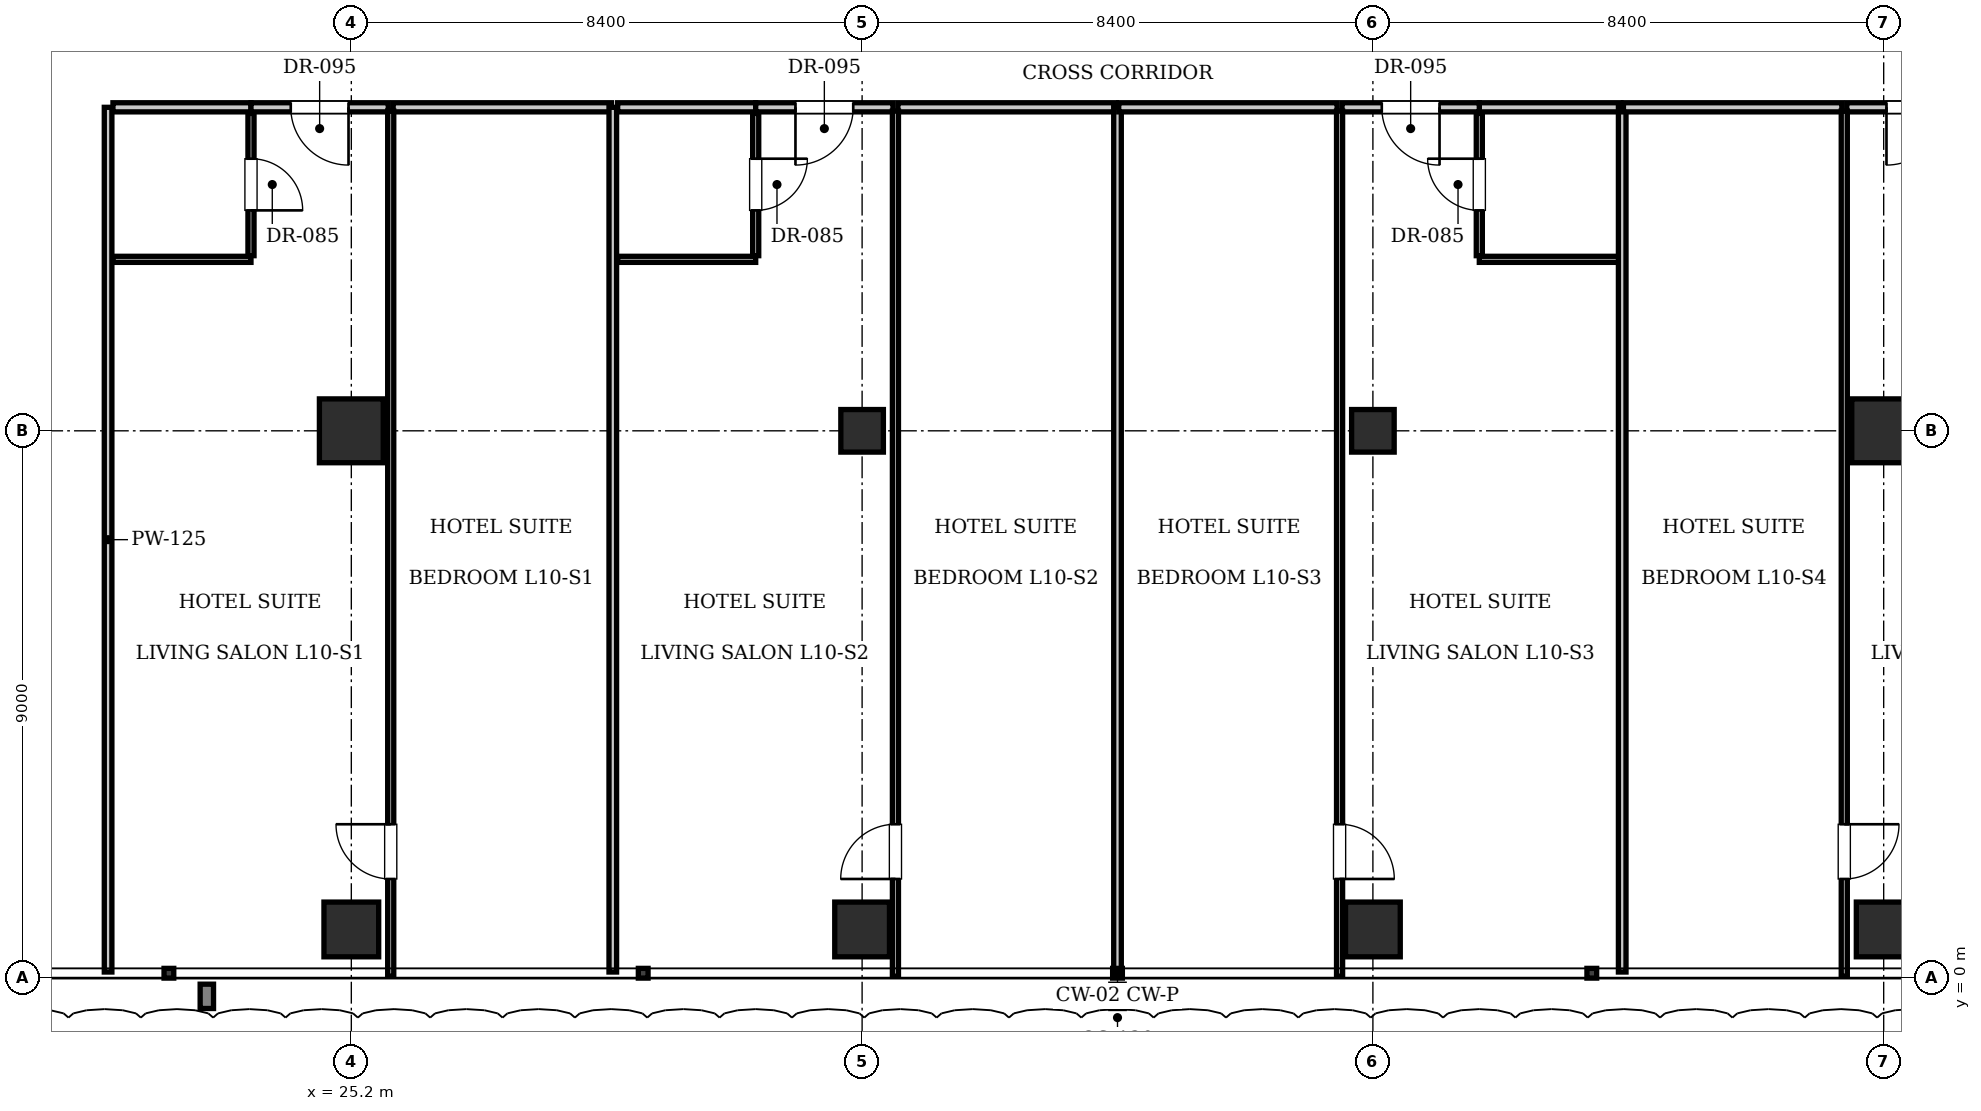
"""IFC4 building model, lengths in metres.
Left out: names, types, materials, properties, quantities, classifications, styles, units other than length and angle.
Written with IfcOpenShell. Run it as: python <this file> out.ifc"""

import sys

from ifc_helpers import new_model, si_unit, direction, frame, frame_2d, origin, origin_2d, place, context, subcontext, project, spatial, rectangle, i_section, extrude, element, fill, save


model = new_model("IFC4")
c1 = context("Model", 3, precision=1e-05, world=origin(), true_north=direction((0.0, 1.0)))
c2 = subcontext(c1, "Body", "Model", "MODEL_VIEW")
j1 = project(units=[si_unit("LENGTHUNIT", "METRE"), si_unit("PLANEANGLEUNIT", "RADIAN")], contexts=[c1])
p1 = place(None, origin())
s1 = spatial("IfcSite", under=j1, at=p1, CompositionType="ELEMENT")
p2 = place(p1, origin())
s2 = spatial("IfcBuilding", under=s1, at=p2, CompositionType="ELEMENT")
p3 = place(p2, frame((0.0, 0.0, 46.2)))
s3 = spatial("IfcBuildingStorey", under=s2, at=p3, CompositionType="ELEMENT", Elevation=46.2)
for number, where, z_axis, x_axis in (
    (1, (25.2, 9.0, 0.0), (0.0, 0.0, 1.0), (1.0, 0.0, 0.0)),
    (2, (50.4, 9.0, 0.0), (0.0, 0.0, 1.0), (1.0, 0.0, 0.0)),
):
    element("IfcColumn", number, at=place(p3, frame(where, z_axis=z_axis, x_axis=x_axis)), inside=s3, PredefinedType="COLUMN", context=c2, shape_type="SweptSolid", body=[
        extrude(rectangle(XDim=1.05, YDim=1.05, at=origin_2d()), origin(), (0.0, 0.0, 1.0), 3.85),
    ])
for number, where, z_axis, x_axis in (
    (3, (33.6, 9.0, 0.0), (0.0, 0.0, 1.0), (1.0, 0.0, 0.0)),
    (4, (42.0, 9.0, 0.0), (0.0, 0.0, 1.0), (1.0, 0.0, 0.0)),
):
    element("IfcColumn", number, at=place(p3, frame(where, z_axis=z_axis, x_axis=x_axis)), inside=s3, PredefinedType="COLUMN", context=c2, shape_type="SweptSolid", body=[
        extrude(i_section(OverallWidth=0.7, OverallDepth=0.7, WebThickness=0.028, FlangeThickness=0.044, at=origin_2d()), origin(), (0.0, 0.0, 1.0), 3.85),
    ])
for number, where, z_axis, x_axis in (
    (5, (25.2, 0.8, 0.0), (0.0, 0.0, 1.0), (1.0, 0.0, 0.0)),
    (6, (33.6, 0.8, 0.0), (0.0, 0.0, 1.0), (1.0, 0.0, 0.0)),
    (7, (42.0, 0.8, 0.0), (0.0, 0.0, 1.0), (1.0, 0.0, 0.0)),
    (8, (50.4, 0.8, 0.0), (0.0, 0.0, 1.0), (1.0, 0.0, 0.0)),
):
    element("IfcColumn", number, at=place(p3, frame(where, z_axis=z_axis, x_axis=x_axis)), inside=s3, PredefinedType="COLUMN", context=c2, shape_type="SweptSolid", body=[
        extrude(rectangle(XDim=0.9, YDim=0.9, at=origin_2d()), origin(), (0.0, 0.0, 1.0), 3.85),
    ])
p4 = place(p3, frame((21.2, 0.1, 0.0), z_axis=(0.0, 0.0, 1.0), x_axis=(0.0, 1.0, 0.0)))
e9 = element("IfcWall", 9, at=p4, inside=s3, PredefinedType="PARTITIONING", context=c2, shape_type="SweptSolid", body=[
    extrude(rectangle(XDim=14.22, YDim=0.125, at=frame_2d((7.11, 0.0))), origin(), (0.0, 0.0, 1.0), 3.61),
])
p5 = place(p3, frame((21.28, 14.32, 0.0), z_axis=(0.0, 0.0, 1.0), x_axis=(1.0, 0.0, 0.0)))
e10 = element("IfcWall", 10, at=p5, inside=s3, PredefinedType="PARTITIONING", context=c2, shape_type="SweptSolid", body=[
    extrude(rectangle(XDim=2.27, YDim=0.15, at=frame_2d((1.135, 0.0))), origin(), (0.0, 0.0, 1.0), 3.61),
])
p6 = place(p3, frame((21.28, 11.82, 0.0), z_axis=(0.0, 0.0, 1.0), x_axis=(1.0, 0.0, 0.0)))
e11 = element("IfcWall", 11, at=p6, inside=s3, PredefinedType="PARTITIONING", context=c2, shape_type="SweptSolid", body=[
    extrude(rectangle(XDim=2.27, YDim=0.1, at=frame_2d((1.135, 0.0))), origin(), (0.0, 0.0, 1.0), 3.61),
])
p7 = place(p3, frame((23.55, 11.88, 0.0), z_axis=(0.0, 0.0, 1.0), x_axis=(0.0, 1.0, 0.0)))
e12 = element("IfcWall", 12, at=p7, inside=s3, PredefinedType="PARTITIONING", context=c2, shape_type="SweptSolid", body=[
    extrude(rectangle(XDim=2.34, YDim=0.1, at=frame_2d((1.17, 0.0))), origin(), (0.0, 0.0, 1.0), 3.61),
])
p8 = place(p7, frame((0.745, 0.0, 0.0)))
e13 = element("IfcOpeningElement", 13, at=p8, cuts=e12, PredefinedType="OPENING", context=c2, shape_type="SweptSolid", body=[
    extrude(rectangle(XDim=0.85, YDim=2.1, at=frame_2d((0.425, 1.05))), frame((0.0, 0.06, 0.0), z_axis=(0.0, -1.0, 0.0), x_axis=(1.0, 0.0, 0.0)), (0.0, 0.0, 1.0), 0.12),
])
p9 = place(p3, frame((23.55, 14.32, 0.0), z_axis=(0.0, 0.0, 1.0), x_axis=(1.0, 0.0, 0.0)))
e14 = element("IfcWall", 14, at=p9, inside=s3, PredefinedType="PARTITIONING", context=c2, shape_type="SweptSolid", body=[
    extrude(rectangle(XDim=2.258, YDim=0.15, at=frame_2d((1.129, 0.0))), origin(), (0.0, 0.0, 1.0), 3.61),
])
p10 = place(p9, frame((0.654, 0.0, 0.0)))
e15 = element("IfcOpeningElement", 15, at=p10, cuts=e14, PredefinedType="OPENING", context=c2, shape_type="SweptSolid", body=[
    extrude(rectangle(XDim=0.95, YDim=2.15, at=frame_2d((0.475, 1.075))), frame((0.0, 0.085, 0.0), z_axis=(0.0, -1.0, 0.0), x_axis=(1.0, 0.0, 0.0)), (0.0, 0.0, 1.0), 0.17),
])
p11 = place(p3, frame((25.888, 14.32, 0.0), z_axis=(0.0, 0.0, 1.0), x_axis=(1.0, 0.0, 0.0)))
e16 = element("IfcWall", 16, at=p11, inside=s3, PredefinedType="PARTITIONING", context=c2, shape_type="SweptSolid", body=[
    extrude(rectangle(XDim=3.592, YDim=0.15, at=frame_2d((1.796, 0.0))), origin(), (0.0, 0.0, 1.0), 3.61),
])
p12 = place(p3, frame((25.848, 0.03, 0.0), z_axis=(0.0, 0.0, 1.0), x_axis=(0.0, 1.0, 0.0)))
e17 = element("IfcWall", 17, at=p12, inside=s3, PredefinedType="PARTITIONING", context=c2, shape_type="SweptSolid", body=[
    extrude(rectangle(XDim=14.23, YDim=0.1, at=frame_2d((7.115, 0.0))), origin(), (0.0, 0.0, 1.0), 3.61),
])
p13 = place(p12, frame((1.6, 0.0, 0.0)))
e18 = element("IfcOpeningElement", 18, at=p13, cuts=e17, PredefinedType="OPENING", context=c2, shape_type="SweptSolid", body=[
    extrude(rectangle(XDim=0.9, YDim=2.1, at=frame_2d((0.45, 1.05))), frame((0.0, 0.06, 0.0), z_axis=(0.0, -1.0, 0.0), x_axis=(1.0, 0.0, 0.0)), (0.0, 0.0, 1.0), 0.12),
])
p14 = place(p3, frame((29.5, 0.1, 0.0), z_axis=(0.0, 0.0, 1.0), x_axis=(0.0, 1.0, 0.0)))
e19 = element("IfcWall", 19, at=p14, inside=s3, PredefinedType="PARTITIONING", context=c2, shape_type="SweptSolid", body=[
    extrude(rectangle(XDim=14.22, YDim=0.125, at=frame_2d((7.11, 0.0))), origin(), (0.0, 0.0, 1.0), 3.255),
])
p15 = place(p3, frame((29.58, 14.32, 0.0), z_axis=(0.0, 0.0, 1.0), x_axis=(1.0, 0.0, 0.0)))
e20 = element("IfcWall", 20, at=p15, inside=s3, PredefinedType="PARTITIONING", context=c2, shape_type="SweptSolid", body=[
    extrude(rectangle(XDim=2.27, YDim=0.15, at=frame_2d((1.135, 0.0))), origin(), (0.0, 0.0, 1.0), 3.61),
])
p16 = place(p3, frame((29.58, 11.82, 0.0), z_axis=(0.0, 0.0, 1.0), x_axis=(1.0, 0.0, 0.0)))
e21 = element("IfcWall", 21, at=p16, inside=s3, PredefinedType="PARTITIONING", context=c2, shape_type="SweptSolid", body=[
    extrude(rectangle(XDim=2.27, YDim=0.1, at=frame_2d((1.135, 0.0))), origin(), (0.0, 0.0, 1.0), 3.61),
])
p17 = place(p3, frame((31.85, 11.88, 0.0), z_axis=(0.0, 0.0, 1.0), x_axis=(0.0, 1.0, 0.0)))
e22 = element("IfcWall", 22, at=p17, inside=s3, PredefinedType="PARTITIONING", context=c2, shape_type="SweptSolid", body=[
    extrude(rectangle(XDim=2.34, YDim=0.1, at=frame_2d((1.17, 0.0))), origin(), (0.0, 0.0, 1.0), 3.61),
])
p18 = place(p17, frame((0.745, 0.0, 0.0)))
e23 = element("IfcOpeningElement", 23, at=p18, cuts=e22, PredefinedType="OPENING", context=c2, shape_type="SweptSolid", body=[
    extrude(rectangle(XDim=0.85, YDim=2.1, at=frame_2d((0.425, 1.05))), frame((0.0, 0.06, 0.0), z_axis=(0.0, -1.0, 0.0), x_axis=(1.0, 0.0, 0.0)), (0.0, 0.0, 1.0), 0.12),
])
p19 = place(p3, frame((31.85, 14.32, 0.0), z_axis=(0.0, 0.0, 1.0), x_axis=(1.0, 0.0, 0.0)))
e24 = element("IfcWall", 24, at=p19, inside=s3, PredefinedType="PARTITIONING", context=c2, shape_type="SweptSolid", body=[
    extrude(rectangle(XDim=2.258, YDim=0.15, at=frame_2d((1.129, 0.0))), origin(), (0.0, 0.0, 1.0), 3.61),
])
p20 = place(p19, frame((0.654, 0.0, 0.0)))
e25 = element("IfcOpeningElement", 25, at=p20, cuts=e24, PredefinedType="OPENING", context=c2, shape_type="SweptSolid", body=[
    extrude(rectangle(XDim=0.95, YDim=2.15, at=frame_2d((0.475, 1.075))), frame((0.0, 0.085, 0.0), z_axis=(0.0, -1.0, 0.0), x_axis=(1.0, 0.0, 0.0)), (0.0, 0.0, 1.0), 0.17),
])
p21 = place(p3, frame((34.188, 14.32, 0.0), z_axis=(0.0, 0.0, 1.0), x_axis=(1.0, 0.0, 0.0)))
e26 = element("IfcWall", 26, at=p21, inside=s3, PredefinedType="PARTITIONING", context=c2, shape_type="SweptSolid", body=[
    extrude(rectangle(XDim=3.592, YDim=0.15, at=frame_2d((1.796, 0.0))), origin(), (0.0, 0.0, 1.0), 3.61),
])
p22 = place(p3, frame((34.148, 0.03, 0.0), z_axis=(0.0, 0.0, 1.0), x_axis=(0.0, 1.0, 0.0)))
e27 = element("IfcWall", 27, at=p22, inside=s3, PredefinedType="PARTITIONING", context=c2, shape_type="SweptSolid", body=[
    extrude(rectangle(XDim=14.23, YDim=0.1, at=frame_2d((7.115, 0.0))), origin(), (0.0, 0.0, 1.0), 3.61),
])
p23 = place(p22, frame((1.6, 0.0, 0.0)))
e28 = element("IfcOpeningElement", 28, at=p23, cuts=e27, PredefinedType="OPENING", context=c2, shape_type="SweptSolid", body=[
    extrude(rectangle(XDim=0.9, YDim=2.1, at=frame_2d((0.45, 1.05))), frame((0.0, 0.06, 0.0), z_axis=(0.0, -1.0, 0.0), x_axis=(1.0, 0.0, 0.0)), (0.0, 0.0, 1.0), 0.12),
])
p24 = place(p3, frame((37.8, 0.1, 0.0), z_axis=(0.0, 0.0, 1.0), x_axis=(0.0, 1.0, 0.0)))
e29 = element("IfcWall", 29, at=p24, inside=s3, PredefinedType="PARTITIONING", context=c2, shape_type="SweptSolid", body=[
    extrude(rectangle(XDim=14.22, YDim=0.125, at=frame_2d((7.11, 0.0))), origin(), (0.0, 0.0, 1.0), 3.293),
])
p25 = place(p3, frame((43.75, 14.32, 0.0), z_axis=(0.0, 0.0, 1.0), x_axis=(1.0, 0.0, 0.0)))
e30 = element("IfcWall", 30, at=p25, inside=s3, PredefinedType="PARTITIONING", context=c2, shape_type="SweptSolid", body=[
    extrude(rectangle(XDim=2.33, YDim=0.15, at=frame_2d((1.165, 0.0))), origin(), (0.0, 0.0, 1.0), 3.61),
])
p26 = place(p3, frame((43.75, 11.82, 0.0), z_axis=(0.0, 0.0, 1.0), x_axis=(1.0, 0.0, 0.0)))
e31 = element("IfcWall", 31, at=p26, inside=s3, PredefinedType="PARTITIONING", context=c2, shape_type="SweptSolid", body=[
    extrude(rectangle(XDim=2.31, YDim=0.1, at=frame_2d((1.155, 0.0))), origin(), (0.0, 0.0, 1.0), 3.61),
])
p27 = place(p3, frame((43.75, 11.88, 0.0), z_axis=(0.0, 0.0, 1.0), x_axis=(0.0, 1.0, 0.0)))
e32 = element("IfcWall", 32, at=p27, inside=s3, PredefinedType="PARTITIONING", context=c2, shape_type="SweptSolid", body=[
    extrude(rectangle(XDim=2.34, YDim=0.1, at=frame_2d((1.17, 0.0))), origin(), (0.0, 0.0, 1.0), 3.61),
])
p28 = place(p27, frame((0.745, 0.0, 0.0)))
e33 = element("IfcOpeningElement", 33, at=p28, cuts=e32, PredefinedType="OPENING", context=c2, shape_type="SweptSolid", body=[
    extrude(rectangle(XDim=0.85, YDim=2.1, at=frame_2d((0.425, 1.05))), frame((0.0, 0.06, 0.0), z_axis=(0.0, -1.0, 0.0), x_axis=(1.0, 0.0, 0.0)), (0.0, 0.0, 1.0), 0.12),
])
p29 = place(p3, frame((37.82, 14.32, 0.0), z_axis=(0.0, 0.0, 1.0), x_axis=(1.0, 0.0, 0.0)))
e34 = element("IfcWall", 34, at=p29, inside=s3, PredefinedType="PARTITIONING", context=c2, shape_type="SweptSolid", body=[
    extrude(rectangle(XDim=3.592, YDim=0.15, at=frame_2d((1.796, 0.0))), origin(), (0.0, 0.0, 1.0), 3.61),
])
p30 = place(p3, frame((41.492, 14.32, 0.0), z_axis=(0.0, 0.0, 1.0), x_axis=(1.0, 0.0, 0.0)))
e35 = element("IfcWall", 35, at=p30, inside=s3, PredefinedType="PARTITIONING", context=c2, shape_type="SweptSolid", body=[
    extrude(rectangle(XDim=2.258, YDim=0.15, at=frame_2d((1.129, 0.0))), origin(), (0.0, 0.0, 1.0), 3.61),
])
p31 = place(p30, frame((0.654, 0.0, 0.0)))
e36 = element("IfcOpeningElement", 36, at=p31, cuts=e35, PredefinedType="OPENING", context=c2, shape_type="SweptSolid", body=[
    extrude(rectangle(XDim=0.95, YDim=2.15, at=frame_2d((0.475, 1.075))), frame((0.0, 0.085, 0.0), z_axis=(0.0, -1.0, 0.0), x_axis=(1.0, 0.0, 0.0)), (0.0, 0.0, 1.0), 0.17),
])
p32 = place(p3, frame((41.452, 0.03, 0.0), z_axis=(0.0, 0.0, 1.0), x_axis=(0.0, 1.0, 0.0)))
e37 = element("IfcWall", 37, at=p32, inside=s3, PredefinedType="PARTITIONING", context=c2, shape_type="SweptSolid", body=[
    extrude(rectangle(XDim=14.23, YDim=0.1, at=frame_2d((7.115, 0.0))), origin(), (0.0, 0.0, 1.0), 3.61),
])
p33 = place(p32, frame((1.6, 0.0, 0.0)))
e38 = element("IfcOpeningElement", 38, at=p33, cuts=e37, PredefinedType="OPENING", context=c2, shape_type="SweptSolid", body=[
    extrude(rectangle(XDim=0.9, YDim=2.1, at=frame_2d((0.45, 1.05))), frame((0.0, 0.06, 0.0), z_axis=(0.0, -1.0, 0.0), x_axis=(1.0, 0.0, 0.0)), (0.0, 0.0, 1.0), 0.12),
])
p34 = place(p3, frame((46.1, 0.1, 0.0), z_axis=(0.0, 0.0, 1.0), x_axis=(0.0, 1.0, 0.0)))
e39 = element("IfcWall", 39, at=p34, inside=s3, PredefinedType="PARTITIONING", context=c2, shape_type="SweptSolid", body=[
    extrude(rectangle(XDim=14.22, YDim=0.125, at=frame_2d((7.11, 0.0))), origin(), (0.0, 0.0, 1.0), 3.3),
])
p35 = place(p3, frame((46.12, 14.32, 0.0), z_axis=(0.0, 0.0, 1.0), x_axis=(1.0, 0.0, 0.0)))
e40 = element("IfcWall", 40, at=p35, inside=s3, PredefinedType="PARTITIONING", context=c2, shape_type="SweptSolid", body=[
    extrude(rectangle(XDim=3.592, YDim=0.15, at=frame_2d((1.796, 0.0))), origin(), (0.0, 0.0, 1.0), 3.61),
])
p36 = place(p3, frame((49.792, 14.32, 0.0), z_axis=(0.0, 0.0, 1.0), x_axis=(1.0, 0.0, 0.0)))
e41 = element("IfcWall", 41, at=p36, inside=s3, PredefinedType="PARTITIONING", context=c2, shape_type="SweptSolid", body=[
    extrude(rectangle(XDim=2.258, YDim=0.15, at=frame_2d((1.129, 0.0))), origin(), (0.0, 0.0, 1.0), 3.61),
])
p37 = place(p36, frame((0.654, 0.0, 0.0)))
e42 = element("IfcOpeningElement", 42, at=p37, cuts=e41, PredefinedType="OPENING", context=c2, shape_type="SweptSolid", body=[
    extrude(rectangle(XDim=0.95, YDim=2.15, at=frame_2d((0.475, 1.075))), frame((0.0, 0.085, 0.0), z_axis=(0.0, -1.0, 0.0), x_axis=(1.0, 0.0, 0.0)), (0.0, 0.0, 1.0), 0.17),
])
p38 = place(p3, frame((49.752, 0.03, 0.0), z_axis=(0.0, 0.0, 1.0), x_axis=(0.0, 1.0, 0.0)))
e43 = element("IfcWall", 43, at=p38, inside=s3, PredefinedType="PARTITIONING", context=c2, shape_type="SweptSolid", body=[
    extrude(rectangle(XDim=14.23, YDim=0.1, at=frame_2d((7.115, 0.0))), origin(), (0.0, 0.0, 1.0), 3.61),
])
p39 = place(p38, frame((1.6, 0.0, 0.0)))
e44 = element("IfcOpeningElement", 44, at=p39, cuts=e43, PredefinedType="OPENING", context=c2, shape_type="SweptSolid", body=[
    extrude(rectangle(XDim=0.9, YDim=2.1, at=frame_2d((0.45, 1.05))), frame((0.0, 0.06, 0.0), z_axis=(0.0, -1.0, 0.0), x_axis=(1.0, 0.0, 0.0)), (0.0, 0.0, 1.0), 0.12),
])
p40 = place(p8, frame((0.85, 0.0, 0.0), z_axis=(0.0, 0.0, 1.0), x_axis=(-1.0, 0.0, 0.0)))
e45 = element("IfcDoor", 45, at=p40, inside=s3, OperationType="SINGLE_SWING_RIGHT", PredefinedType="DOOR", context=c2, shape_type="SweptSolid", body=[
    extrude(rectangle(XDim=0.85, YDim=2.1, at=frame_2d((0.425, 1.05))), frame((0.0, 0.025, 0.0), z_axis=(0.0, -1.0, 0.0), x_axis=(1.0, 0.0, 0.0)), (0.0, 0.0, 1.0), 0.05),
])
fill(e13, e45)
p41 = place(p10, frame((0.95, 0.0, 0.0), z_axis=(0.0, 0.0, 1.0), x_axis=(-1.0, 0.0, 0.0)))
e46 = element("IfcDoor", 46, at=p41, inside=s3, OperationType="SINGLE_SWING_LEFT", PredefinedType="DOOR", context=c2, shape_type="SweptSolid", body=[
    extrude(rectangle(XDim=0.95, YDim=2.15, at=frame_2d((0.475, 1.075))), frame((0.0, 0.025, 0.0), z_axis=(0.0, -1.0, 0.0), x_axis=(1.0, 0.0, 0.0)), (0.0, 0.0, 1.0), 0.05),
])
fill(e15, e46)
p42 = place(p13, origin())
e47 = element("IfcDoor", 47, at=p42, inside=s3, OperationType="SINGLE_SWING_RIGHT", PredefinedType="DOOR", context=c2, shape_type="SweptSolid", body=[
    extrude(rectangle(XDim=0.9, YDim=2.1, at=frame_2d((0.45, 1.05))), frame((0.0, 0.025, 0.0), z_axis=(0.0, -1.0, 0.0), x_axis=(1.0, 0.0, 0.0)), (0.0, 0.0, 1.0), 0.05),
])
fill(e18, e47)
p43 = place(p18, frame((0.85, 0.0, 0.0), z_axis=(0.0, 0.0, 1.0), x_axis=(-1.0, 0.0, 0.0)))
e48 = element("IfcDoor", 48, at=p43, inside=s3, OperationType="SINGLE_SWING_LEFT", PredefinedType="DOOR", context=c2, shape_type="SweptSolid", body=[
    extrude(rectangle(XDim=0.85, YDim=2.1, at=frame_2d((0.425, 1.05))), frame((0.0, 0.025, 0.0), z_axis=(0.0, -1.0, 0.0), x_axis=(1.0, 0.0, 0.0)), (0.0, 0.0, 1.0), 0.05),
])
fill(e23, e48)
p44 = place(p20, frame((0.95, 0.0, 0.0), z_axis=(0.0, 0.0, 1.0), x_axis=(-1.0, 0.0, 0.0)))
e49 = element("IfcDoor", 49, at=p44, inside=s3, OperationType="SINGLE_SWING_RIGHT", PredefinedType="DOOR", context=c2, shape_type="SweptSolid", body=[
    extrude(rectangle(XDim=0.95, YDim=2.15, at=frame_2d((0.475, 1.075))), frame((0.0, 0.025, 0.0), z_axis=(0.0, -1.0, 0.0), x_axis=(1.0, 0.0, 0.0)), (0.0, 0.0, 1.0), 0.05),
])
fill(e25, e49)
p45 = place(p23, origin())
e50 = element("IfcDoor", 50, at=p45, inside=s3, OperationType="SINGLE_SWING_LEFT", PredefinedType="DOOR", context=c2, shape_type="SweptSolid", body=[
    extrude(rectangle(XDim=0.9, YDim=2.1, at=frame_2d((0.45, 1.05))), frame((0.0, 0.025, 0.0), z_axis=(0.0, -1.0, 0.0), x_axis=(1.0, 0.0, 0.0)), (0.0, 0.0, 1.0), 0.05),
])
fill(e28, e50)
p46 = place(p28, origin())
e51 = element("IfcDoor", 51, at=p46, inside=s3, OperationType="SINGLE_SWING_RIGHT", PredefinedType="DOOR", context=c2, shape_type="SweptSolid", body=[
    extrude(rectangle(XDim=0.85, YDim=2.1, at=frame_2d((0.425, 1.05))), frame((0.0, 0.025, 0.0), z_axis=(0.0, -1.0, 0.0), x_axis=(1.0, 0.0, 0.0)), (0.0, 0.0, 1.0), 0.05),
])
fill(e33, e51)
p47 = place(p31, frame((0.95, 0.0, 0.0), z_axis=(0.0, 0.0, 1.0), x_axis=(-1.0, 0.0, 0.0)))
e52 = element("IfcDoor", 52, at=p47, inside=s3, OperationType="SINGLE_SWING_LEFT", PredefinedType="DOOR", context=c2, shape_type="SweptSolid", body=[
    extrude(rectangle(XDim=0.95, YDim=2.15, at=frame_2d((0.475, 1.075))), frame((0.0, 0.025, 0.0), z_axis=(0.0, -1.0, 0.0), x_axis=(1.0, 0.0, 0.0)), (0.0, 0.0, 1.0), 0.05),
])
fill(e36, e52)
p48 = place(p33, frame((0.9, 0.0, 0.0), z_axis=(0.0, 0.0, 1.0), x_axis=(-1.0, 0.0, 0.0)))
e53 = element("IfcDoor", 53, at=p48, inside=s3, OperationType="SINGLE_SWING_RIGHT", PredefinedType="DOOR", context=c2, shape_type="SweptSolid", body=[
    extrude(rectangle(XDim=0.9, YDim=2.1, at=frame_2d((0.45, 1.05))), frame((0.0, 0.025, 0.0), z_axis=(0.0, -1.0, 0.0), x_axis=(1.0, 0.0, 0.0)), (0.0, 0.0, 1.0), 0.05),
])
fill(e38, e53)
p49 = place(p37, frame((0.95, 0.0, 0.0), z_axis=(0.0, 0.0, 1.0), x_axis=(-1.0, 0.0, 0.0)))
e54 = element("IfcDoor", 54, at=p49, inside=s3, OperationType="SINGLE_SWING_RIGHT", PredefinedType="DOOR", context=c2, shape_type="SweptSolid", body=[
    extrude(rectangle(XDim=0.95, YDim=2.15, at=frame_2d((0.475, 1.075))), frame((0.0, 0.025, 0.0), z_axis=(0.0, -1.0, 0.0), x_axis=(1.0, 0.0, 0.0)), (0.0, 0.0, 1.0), 0.05),
])
fill(e42, e54)
p50 = place(p39, frame((0.9, 0.0, 0.0), z_axis=(0.0, 0.0, 1.0), x_axis=(-1.0, 0.0, 0.0)))
e55 = element("IfcDoor", 55, at=p50, inside=s3, OperationType="SINGLE_SWING_LEFT", PredefinedType="DOOR", context=c2, shape_type="SweptSolid", body=[
    extrude(rectangle(XDim=0.9, YDim=2.1, at=frame_2d((0.45, 1.05))), frame((0.0, 0.025, 0.0), z_axis=(0.0, -1.0, 0.0), x_axis=(1.0, 0.0, 0.0)), (0.0, 0.0, 1.0), 0.05),
])
fill(e44, e55)
save(model, sys.argv[1])
